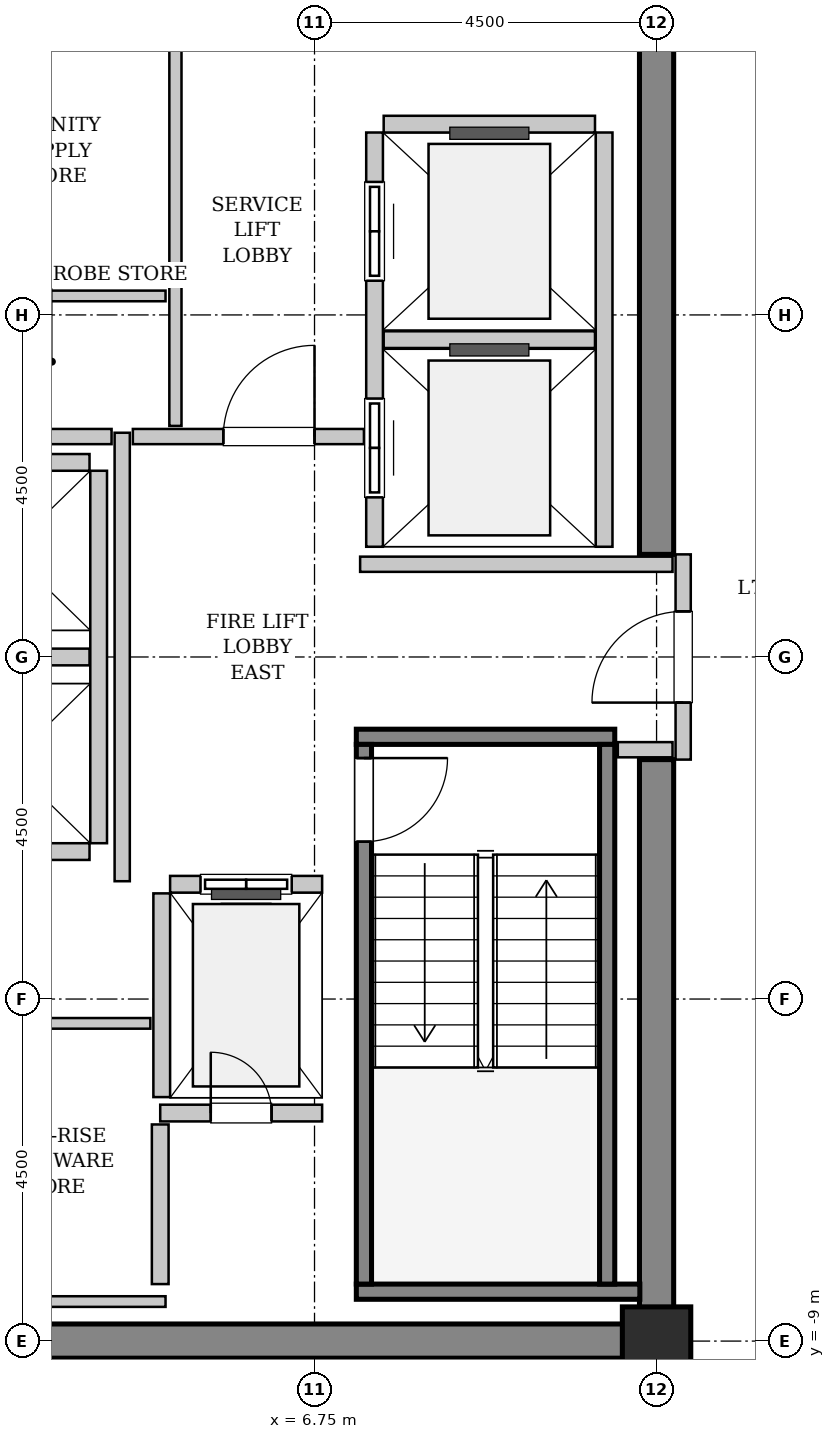
"""IFC4 building model, lengths in metres.
Left out: names, types, materials, properties, quantities, classifications, styles, units other than length and angle.
Written with IfcOpenShell. Run it as: python <this file> out.ifc"""

import sys

from ifc_helpers import new_model, si_unit, direction, frame, frame_2d, origin, origin_2d, place, context, subcontext, project, spatial, rectangle, extrude, source, transform, mapped, element, fill, save


model = new_model("IFC4")
c1 = context("Model", 3, precision=1e-05, world=origin(), true_north=direction((0.0, 1.0)))
c2 = subcontext(c1, "Body", "Model", "MODEL_VIEW")
j1 = project(units=[si_unit("LENGTHUNIT", "METRE"), si_unit("PLANEANGLEUNIT", "RADIAN")], contexts=[c1])
p1 = place(None, origin())
s1 = spatial("IfcSite", under=j1, at=p1, CompositionType="ELEMENT")
p2 = place(p1, origin())
s2 = spatial("IfcBuilding", under=s1, at=p2, CompositionType="ELEMENT")
p3 = place(p2, frame((0.0, 0.0, 310.2)))
s3 = spatial("IfcBuildingStorey", under=s2, at=p3, CompositionType="ELEMENT", Elevation=310.2)
m1 = source(origin(), c2, "Body", "SweptSolid", [
    extrude(rectangle(XDim=9.925, YDim=0.45, at=frame_2d((4.962, 0.0))), origin(), (0.0, 0.0, 1.0), 3.8),
])
p4 = place(p3, frame((1.55, -9.0, 0.0), z_axis=(0.0, 0.0, 1.0), x_axis=(1.0, 0.0, 0.0)))
e1 = element("IfcWall", 1, at=p4, inside=s3, PredefinedType="SHEAR", context=c2, shape_type="MappedRepresentation", body=[
    mapped(m1, transform((0.0, 0.0, 0.0), x_axis=(1.0, 0.0, 0.0), y_axis=(0.0, 1.0, 0.0), z_axis=(0.0, 0.0, 1.0), scale=1.0)),
])
m2 = source(origin(), c2, "Body", "SweptSolid", [
    extrude(rectangle(XDim=7.425, YDim=0.45, at=frame_2d((3.712, 0.0))), origin(), (0.0, 0.0, 1.0), 3.8),
])
for number, where, z_axis, x_axis in (
    (2, (11.25, -8.775, 0.0), (0.0, 0.0, 1.0), (0.0, 1.0, 0.0)),
    (3, (11.25, 1.35, 0.0), (0.0, 0.0, 1.0), (0.0, 1.0, 0.0)),
):
    element("IfcWall", number, at=place(p3, frame(where, z_axis=z_axis, x_axis=x_axis)), inside=s3, PredefinedType="SHEAR", context=c2, shape_type="MappedRepresentation", body=[
        mapped(m2, transform((0.0, 0.0, 0.0), x_axis=(1.0, 0.0, 0.0), y_axis=(0.0, 1.0, 0.0), z_axis=(0.0, 0.0, 1.0), scale=1.0)),
    ])
m3 = source(origin(), c2, "Body", "SweptSolid", [
    extrude(rectangle(XDim=0.9, YDim=0.9, at=origin_2d()), origin(), (0.0, 0.0, 1.0), 3.8),
])
p5 = place(p3, frame((11.25, -9.0, 0.0), z_axis=(0.0, 0.0, 1.0), x_axis=(1.0, 0.0, 0.0)))
e4 = element("IfcColumn", 4, at=p5, inside=s3, PredefinedType="COLUMN", context=c2, shape_type="MappedRepresentation", body=[
    mapped(m3, transform((0.0, 0.0, 0.0), x_axis=(1.0, 0.0, 0.0), y_axis=(0.0, 1.0, 0.0), z_axis=(0.0, 0.0, 1.0), scale=1.0)),
])
m4 = source(origin(), c2, "Body", "SweptSolid", [
    extrude(rectangle(XDim=3.4, YDim=0.2, at=frame_2d((1.7, 0.0))), origin(), (0.0, 0.0, 1.0), 3.8),
])
p6 = place(p3, frame((7.3, -1.05, 0.0), z_axis=(0.0, 0.0, 1.0), x_axis=(1.0, 0.0, 0.0)))
e5 = element("IfcWall", 5, at=p6, inside=s3, PredefinedType="SOLIDWALL", context=c2, shape_type="MappedRepresentation", body=[
    mapped(m4, transform((0.0, 0.0, 0.0), x_axis=(1.0, 0.0, 0.0), y_axis=(0.0, 1.0, 0.0), z_axis=(0.0, 0.0, 1.0), scale=1.0)),
])
m5 = source(origin(), c2, "Body", "SweptSolid", [
    extrude(rectangle(XDim=3.73, YDim=0.2, at=frame_2d((1.865, 0.0))), origin(), (0.0, 0.0, 1.0), 3.8),
])
p7 = place(p3, frame((7.3, -8.35, 0.0), z_axis=(0.0, 0.0, 1.0), x_axis=(1.0, 0.0, 0.0)))
e6 = element("IfcWall", 6, at=p7, inside=s3, PredefinedType="SOLIDWALL", context=c2, shape_type="MappedRepresentation", body=[
    mapped(m5, transform((0.0, 0.0, 0.0), x_axis=(1.0, 0.0, 0.0), y_axis=(0.0, 1.0, 0.0), z_axis=(0.0, 0.0, 1.0), scale=1.0)),
])
m6 = source(origin(), c2, "Body", "SweptSolid", [
    extrude(rectangle(XDim=7.1, YDim=0.2, at=frame_2d((3.55, 0.0))), origin(), (0.0, 0.0, 1.0), 3.8),
])
p8 = place(p3, frame((7.4, -1.15, 0.0), z_axis=(0.0, 0.0, 1.0), x_axis=(0.0, -1.0, 0.0)))
e7 = element("IfcWall", 7, at=p8, inside=s3, PredefinedType="SOLIDWALL", context=c2, shape_type="MappedRepresentation", body=[
    mapped(m6, transform((0.0, 0.0, 0.0), x_axis=(1.0, 0.0, 0.0), y_axis=(0.0, 1.0, 0.0), z_axis=(0.0, 0.0, 1.0), scale=1.0)),
])
p9 = place(p8, frame((0.18, 0.0, 0.0)))
e8 = element("IfcOpeningElement", 8, at=p9, cuts=e7, PredefinedType="OPENING", context=c2, shape_type="SweptSolid", body=[
    extrude(rectangle(XDim=1.1, YDim=2.15, at=frame_2d((0.55, 1.075))), frame((0.0, 0.11, 0.0), z_axis=(0.0, -1.0, 0.0), x_axis=(1.0, 0.0, 0.0)), (0.0, 0.0, 1.0), 0.22),
])
p10 = place(p3, frame((10.6, -1.15, 0.0), z_axis=(0.0, 0.0, 1.0), x_axis=(0.0, -1.0, 0.0)))
e9 = element("IfcWall", 9, at=p10, inside=s3, PredefinedType="SOLIDWALL", context=c2, shape_type="MappedRepresentation", body=[
    mapped(m6, transform((0.0, 0.0, 0.0), x_axis=(1.0, 0.0, 0.0), y_axis=(0.0, 1.0, 0.0), z_axis=(0.0, 0.0, 1.0), scale=1.0)),
])
m7 = source(origin(), c2, "Body", "SweptSolid", [
    extrude(rectangle(XDim=2.0, YDim=0.22, at=frame_2d((1.0, 0.0))), origin(), (0.0, 0.0, 1.0), 3.535),
])
p11 = place(p3, frame((6.85, -2.99, 0.0), z_axis=(0.0, 0.0, 1.0), x_axis=(-1.0, 0.0, 0.0)))
e10 = element("IfcWall", 10, at=p11, inside=s3, PredefinedType="SOLIDWALL", context=c2, shape_type="MappedRepresentation", body=[
    mapped(m7, transform((0.0, 0.0, 0.0), x_axis=(1.0, 0.0, 0.0), y_axis=(0.0, 1.0, 0.0), z_axis=(0.0, 0.0, 1.0), scale=1.0)),
])
p12 = place(p11, frame((0.4, 0.0, 0.0)))
e11 = element("IfcOpeningElement", 11, at=p12, cuts=e10, PredefinedType="OPENING", context=c2, shape_type="SweptSolid", body=[
    extrude(rectangle(XDim=1.2, YDim=2.2, at=frame_2d((0.6, 1.1))), frame((0.0, 0.12, 0.0), z_axis=(0.0, -1.0, 0.0), x_axis=(1.0, 0.0, 0.0)), (0.0, 0.0, 1.0), 0.24),
])
m8 = source(origin(), c2, "Body", "SweptSolid", [
    extrude(rectangle(XDim=2.68, YDim=0.22, at=frame_2d((1.34, 0.0))), origin(), (0.0, 0.0, 1.0), 3.535),
])
p13 = place(p3, frame((4.74, -3.11, 0.0), z_axis=(0.0, 0.0, 1.0), x_axis=(0.0, -1.0, 0.0)))
e12 = element("IfcWall", 12, at=p13, inside=s3, PredefinedType="SOLIDWALL", context=c2, shape_type="MappedRepresentation", body=[
    mapped(m8, transform((0.0, 0.0, 0.0), x_axis=(1.0, 0.0, 0.0), y_axis=(0.0, 1.0, 0.0), z_axis=(0.0, 0.0, 1.0), scale=1.0)),
])
m9 = source(origin(), c2, "Body", "SweptSolid", [
    extrude(rectangle(XDim=5.45, YDim=0.22, at=frame_2d((2.725, 0.0))), origin(), (0.0, 0.0, 1.0), 3.535),
])
p14 = place(p3, frame((7.54, 6.9, 0.0), z_axis=(0.0, 0.0, 1.0), x_axis=(0.0, -1.0, 0.0)))
e13 = element("IfcWall", 13, at=p14, inside=s3, PredefinedType="SOLIDWALL", context=c2, shape_type="MappedRepresentation", body=[
    mapped(m9, transform((0.0, 0.0, 0.0), x_axis=(1.0, 0.0, 0.0), y_axis=(0.0, 1.0, 0.0), z_axis=(0.0, 0.0, 1.0), scale=1.0)),
])
p15 = place(p14, frame((3.5, 0.0, 0.0)))
e14 = element("IfcOpeningElement", 14, at=p15, cuts=e13, PredefinedType="OPENING", context=c2, shape_type="SweptSolid", body=[
    extrude(rectangle(XDim=1.3, YDim=2.3, at=frame_2d((0.65, 1.15))), frame((0.0, 0.12, 0.0), z_axis=(0.0, -1.0, 0.0), x_axis=(1.0, 0.0, 0.0)), (0.0, 0.0, 1.0), 0.24),
])
p16 = place(p14, frame((0.65, 0.0, 0.0)))
e15 = element("IfcOpeningElement", 15, at=p16, cuts=e13, PredefinedType="OPENING", context=c2, shape_type="SweptSolid", body=[
    extrude(rectangle(XDim=1.3, YDim=2.3, at=frame_2d((0.65, 1.15))), frame((0.0, 0.12, 0.0), z_axis=(0.0, -1.0, 0.0), x_axis=(1.0, 0.0, 0.0)), (0.0, 0.0, 1.0), 0.24),
])
p17 = place(p3, frame((10.56, 1.45, 0.0), z_axis=(0.0, 0.0, 1.0), x_axis=(0.0, 1.0, 0.0)))
e16 = element("IfcWall", 16, at=p17, inside=s3, PredefinedType="SOLIDWALL", context=c2, shape_type="MappedRepresentation", body=[
    mapped(m9, transform((0.0, 0.0, 0.0), x_axis=(1.0, 0.0, 0.0), y_axis=(0.0, 1.0, 0.0), z_axis=(0.0, 0.0, 1.0), scale=1.0)),
])
m10 = source(origin(), c2, "Body", "SweptSolid", [
    extrude(rectangle(XDim=2.78, YDim=0.22, at=frame_2d((1.39, 0.0))), origin(), (0.0, 0.0, 1.0), 3.535),
])
for number, where, z_axis, x_axis in (
    (17, (7.66, 4.175, 0.0), (0.0, 0.0, 1.0), (1.0, 0.0, 0.0)),
    (18, (10.44, 7.01, 0.0), (0.0, 0.0, 1.0), (-1.0, 0.0, 0.0)),
):
    element("IfcWall", number, at=place(p3, frame(where, z_axis=z_axis, x_axis=x_axis)), inside=s3, PredefinedType="SOLIDWALL", context=c2, shape_type="MappedRepresentation", body=[
        mapped(m10, transform((0.0, 0.0, 0.0), x_axis=(1.0, 0.0, 0.0), y_axis=(0.0, 1.0, 0.0), z_axis=(0.0, 0.0, 1.0), scale=1.0)),
    ])
m11 = source(origin(), c2, "Body", "SweptSolid", [
    extrude(rectangle(XDim=4.9, YDim=0.22, at=frame_2d((2.45, 0.0))), origin(), (0.0, 0.0, 1.0), 3.535),
])
p18 = place(p3, frame((3.91, -2.45, 0.0), z_axis=(0.0, 0.0, 1.0), x_axis=(0.0, 1.0, 0.0)))
e19 = element("IfcWall", 19, at=p18, inside=s3, PredefinedType="SOLIDWALL", context=c2, shape_type="MappedRepresentation", body=[
    mapped(m11, transform((0.0, 0.0, 0.0), x_axis=(1.0, 0.0, 0.0), y_axis=(0.0, 1.0, 0.0), z_axis=(0.0, 0.0, 1.0), scale=1.0)),
])
m12 = source(origin(), c2, "Body", "SweptSolid", [
    extrude(rectangle(XDim=2.13, YDim=0.22, at=frame_2d((1.065, 0.0))), origin(), (0.0, 0.0, 1.0), 3.535),
])
for number, where, z_axis, x_axis in (
    (20, (1.66, -2.56, 0.0), (0.0, 0.0, 1.0), (1.0, 0.0, 0.0)),
    (21, (1.66, 0.0, 0.0), (0.0, 0.0, 1.0), (1.0, 0.0, 0.0)),
    (22, (3.79, 2.56, 0.0), (0.0, 0.0, 1.0), (-1.0, 0.0, 0.0)),
):
    element("IfcWall", number, at=place(p3, frame(where, z_axis=z_axis, x_axis=x_axis)), inside=s3, PredefinedType="SOLIDWALL", context=c2, shape_type="MappedRepresentation", body=[
        mapped(m12, transform((0.0, 0.0, 0.0), x_axis=(1.0, 0.0, 0.0), y_axis=(0.0, 1.0, 0.0), z_axis=(0.0, 0.0, 1.0), scale=1.0)),
    ])
p19 = place(p3, frame((4.72, -6.0, 0.0), z_axis=(0.0, 0.0, 1.0), x_axis=(1.0, 0.0, 0.0)))
e23 = element("IfcWall", 23, at=p19, inside=s3, PredefinedType="SOLIDWALL", context=c2, shape_type="MappedRepresentation", body=[
    mapped(m12, transform((0.0, 0.0, 0.0), x_axis=(1.0, 0.0, 0.0), y_axis=(0.0, 1.0, 0.0), z_axis=(0.0, 0.0, 1.0), scale=1.0)),
])
p20 = place(p19, frame((0.665, 0.0, 0.0)))
e24 = element("IfcOpeningElement", 24, at=p20, cuts=e23, PredefinedType="OPENING", context=c2, shape_type="SweptSolid", body=[
    extrude(rectangle(XDim=0.8, YDim=2.0, at=frame_2d((0.4, 1.0))), frame((0.0, 0.12, 0.0), z_axis=(0.0, -1.0, 0.0), x_axis=(1.0, 0.0, 0.0)), (0.0, 0.0, 1.0), 0.24),
])
m13 = source(origin(), c2, "Body", "SweptSolid", [
    extrude(rectangle(XDim=2.1, YDim=0.22, at=frame_2d((1.05, 0.0))), origin(), (0.0, 0.0, 1.0), 3.535),
])
p21 = place(p3, frame((4.72, -8.25, 0.0), z_axis=(0.0, 0.0, 1.0), x_axis=(0.0, 1.0, 0.0)))
e25 = element("IfcWall", 25, at=p21, inside=s3, PredefinedType="SOLIDWALL", context=c2, shape_type="MappedRepresentation", body=[
    mapped(m13, transform((0.0, 0.0, 0.0), x_axis=(1.0, 0.0, 0.0), y_axis=(0.0, 1.0, 0.0), z_axis=(0.0, 0.0, 1.0), scale=1.0)),
])
m14 = source(origin(), c2, "Body", "SweptSolid", [
    extrude(rectangle(XDim=2.7, YDim=0.2, at=frame_2d((1.35, 0.0))), origin(), (0.0, 0.0, 1.0), 2.625),
])
p22 = place(p3, frame((11.6, -1.35, 0.0), z_axis=(0.0, 0.0, 1.0), x_axis=(0.0, 1.0, 0.0)))
e26 = element("IfcWall", 26, at=p22, inside=s3, PredefinedType="PARTITIONING", context=c2, shape_type="MappedRepresentation", body=[
    mapped(m14, transform((0.0, 0.0, 0.0), x_axis=(1.0, 0.0, 0.0), y_axis=(0.0, 1.0, 0.0), z_axis=(0.0, 0.0, 1.0), scale=1.0)),
])
p23 = place(p22, frame((0.75, 0.0, 0.0)))
e27 = element("IfcOpeningElement", 27, at=p23, cuts=e26, PredefinedType="OPENING", context=c2, shape_type="SweptSolid", body=[
    extrude(rectangle(XDim=1.2, YDim=2.15, at=frame_2d((0.6, 1.075))), frame((0.0, 0.11, 0.0), z_axis=(0.0, -1.0, 0.0), x_axis=(1.0, 0.0, 0.0)), (0.0, 0.0, 1.0), 0.22),
])
m15 = source(origin(), c2, "Body", "SweptSolid", [
    extrude(rectangle(XDim=5.9, YDim=0.2, at=frame_2d((2.95, 0.0))), origin(), (0.0, 0.0, 1.0), 3.535),
])
p24 = place(p3, frame((4.22, -2.95, 0.0), z_axis=(0.0, 0.0, 1.0), x_axis=(0.0, 1.0, 0.0)))
e28 = element("IfcWall", 28, at=p24, inside=s3, PredefinedType="PARTITIONING", context=c2, shape_type="MappedRepresentation", body=[
    mapped(m15, transform((0.0, 0.0, 0.0), x_axis=(1.0, 0.0, 0.0), y_axis=(0.0, 1.0, 0.0), z_axis=(0.0, 0.0, 1.0), scale=1.0)),
])
m16 = source(origin(), c2, "Body", "SweptSolid", [
    extrude(rectangle(XDim=2.52, YDim=0.2, at=frame_2d((1.26, 0.0))), origin(), (0.0, 0.0, 1.0), 3.535),
])
p25 = place(p3, frame((1.56, 2.9, 0.0), z_axis=(0.0, 0.0, 1.0), x_axis=(1.0, 0.0, 0.0)))
e29 = element("IfcWall", 29, at=p25, inside=s3, PredefinedType="PARTITIONING", context=c2, shape_type="MappedRepresentation", body=[
    mapped(m16, transform((0.0, 0.0, 0.0), x_axis=(1.0, 0.0, 0.0), y_axis=(0.0, 1.0, 0.0), z_axis=(0.0, 0.0, 1.0), scale=1.0)),
])
m17 = source(origin(), c2, "Body", "SweptSolid", [
    extrude(rectangle(XDim=3.04, YDim=0.2, at=frame_2d((1.52, 0.0))), origin(), (0.0, 0.0, 1.0), 3.535),
])
p26 = place(p3, frame((4.36, 2.9, 0.0), z_axis=(0.0, 0.0, 1.0), x_axis=(1.0, 0.0, 0.0)))
e30 = element("IfcWall", 30, at=p26, inside=s3, PredefinedType="PARTITIONING", context=c2, shape_type="MappedRepresentation", body=[
    mapped(m17, transform((0.0, 0.0, 0.0), x_axis=(1.0, 0.0, 0.0), y_axis=(0.0, 1.0, 0.0), z_axis=(0.0, 0.0, 1.0), scale=1.0)),
])
p27 = place(p26, frame((1.19, 0.0, 0.0)))
e31 = element("IfcOpeningElement", 31, at=p27, cuts=e30, PredefinedType="OPENING", context=c2, shape_type="SweptSolid", body=[
    extrude(rectangle(XDim=1.2, YDim=2.15, at=frame_2d((0.6, 1.075))), frame((0.0, 0.11, 0.0), z_axis=(0.0, -1.0, 0.0), x_axis=(1.0, 0.0, 0.0)), (0.0, 0.0, 1.0), 0.22),
])
m18 = source(origin(), c2, "Body", "SweptSolid", [
    extrude(rectangle(XDim=4.11, YDim=0.2, at=frame_2d((2.055, 0.0))), origin(), (0.0, 0.0, 1.0), 3.535),
])
p28 = place(p3, frame((7.35, 1.22, 0.0), z_axis=(0.0, 0.0, 1.0), x_axis=(1.0, 0.0, 0.0)))
e32 = element("IfcWall", 32, at=p28, inside=s3, PredefinedType="PARTITIONING", context=c2, shape_type="MappedRepresentation", body=[
    mapped(m18, transform((0.0, 0.0, 0.0), x_axis=(1.0, 0.0, 0.0), y_axis=(0.0, 1.0, 0.0), z_axis=(0.0, 0.0, 1.0), scale=1.0)),
])
m19 = source(origin(), c2, "Body", "SweptSolid", [
    extrude(rectangle(XDim=0.72, YDim=0.2, at=frame_2d((0.36, 0.0))), origin(), (0.0, 0.0, 1.0), 3.535),
])
p29 = place(p3, frame((10.74, -1.22, 0.0), z_axis=(0.0, 0.0, 1.0), x_axis=(1.0, 0.0, 0.0)))
e33 = element("IfcWall", 33, at=p29, inside=s3, PredefinedType="PARTITIONING", context=c2, shape_type="MappedRepresentation", body=[
    mapped(m19, transform((0.0, 0.0, 0.0), x_axis=(1.0, 0.0, 0.0), y_axis=(0.0, 1.0, 0.0), z_axis=(0.0, 0.0, 1.0), scale=1.0)),
])
m20 = source(origin(), c2, "Body", "SweptSolid", [
    extrude(rectangle(XDim=5.45, YDim=0.16, at=frame_2d((2.725, 0.0))), origin(), (0.0, 0.0, 1.0), 3.535),
])
p30 = place(p3, frame((4.92, 3.04, 0.0), z_axis=(0.0, 0.0, 1.0), x_axis=(0.0, 1.0, 0.0)))
e34 = element("IfcWall", 34, at=p30, inside=s3, PredefinedType="PARTITIONING", context=c2, shape_type="MappedRepresentation", body=[
    mapped(m20, transform((0.0, 0.0, 0.0), x_axis=(1.0, 0.0, 0.0), y_axis=(0.0, 1.0, 0.0), z_axis=(0.0, 0.0, 1.0), scale=1.0)),
])
m21 = source(origin(), c2, "Body", "SweptSolid", [
    extrude(rectangle(XDim=3.15, YDim=0.14, at=frame_2d((1.575, 0.0))), origin(), (0.0, 0.0, 1.0), 3.535),
])
p31 = place(p3, frame((1.64, 4.75, 0.0), z_axis=(0.0, 0.0, 1.0), x_axis=(1.0, 0.0, 0.0)))
e35 = element("IfcWall", 35, at=p31, inside=s3, PredefinedType="PARTITIONING", context=c2, shape_type="MappedRepresentation", body=[
    mapped(m21, transform((0.0, 0.0, 0.0), x_axis=(1.0, 0.0, 0.0), y_axis=(0.0, 1.0, 0.0), z_axis=(0.0, 0.0, 1.0), scale=1.0)),
])
m22 = source(origin(), c2, "Body", "SweptSolid", [
    extrude(rectangle(XDim=2.95, YDim=0.14, at=frame_2d((1.475, 0.0))), origin(), (0.0, 0.0, 1.0), 3.535),
])
p32 = place(p3, frame((1.64, -4.82, 0.0), z_axis=(0.0, 0.0, 1.0), x_axis=(1.0, 0.0, 0.0)))
e36 = element("IfcWall", 36, at=p32, inside=s3, PredefinedType="PARTITIONING", context=c2, shape_type="MappedRepresentation", body=[
    mapped(m22, transform((0.0, 0.0, 0.0), x_axis=(1.0, 0.0, 0.0), y_axis=(0.0, 1.0, 0.0), z_axis=(0.0, 0.0, 1.0), scale=1.0)),
])
p33 = place(p3, frame((1.64, -8.48, 0.0), z_axis=(0.0, 0.0, 1.0), x_axis=(1.0, 0.0, 0.0)))
e37 = element("IfcWall", 37, at=p33, inside=s3, PredefinedType="PARTITIONING", context=c2, shape_type="MappedRepresentation", body=[
    mapped(m21, transform((0.0, 0.0, 0.0), x_axis=(1.0, 0.0, 0.0), y_axis=(0.0, 1.0, 0.0), z_axis=(0.0, 0.0, 1.0), scale=1.0)),
])
m23 = source(origin(), c2, "Body", "SweptSolid", [
    extrude(rectangle(XDim=1.1, YDim=2.15, at=frame_2d((0.55, 1.075))), frame((0.0, 0.025, 0.0), z_axis=(0.0, -1.0, 0.0), x_axis=(1.0, 0.0, 0.0)), (0.0, 0.0, 1.0), 0.05),
])
p34 = place(p9, origin())
e38 = element("IfcDoor", 38, at=p34, inside=s3, OperationType="SINGLE_SWING_LEFT", PredefinedType="DOOR", context=c2, shape_type="MappedRepresentation", body=[
    mapped(m23, transform((0.0, 0.0, 0.0), x_axis=(1.0, 0.0, 0.0), y_axis=(0.0, 1.0, 0.0), z_axis=(0.0, 0.0, 1.0), scale=1.0)),
])
fill(e8, e38)
m24 = source(origin(), c2, "Body", "SweptSolid", [
    extrude(rectangle(XDim=1.2, YDim=2.2, at=frame_2d((0.6, 1.1))), frame((0.0, 0.025, 0.0), z_axis=(0.0, -1.0, 0.0), x_axis=(1.0, 0.0, 0.0)), (0.0, 0.0, 1.0), 0.05),
])
p35 = place(p12, origin())
e39 = element("IfcDoor", 39, at=p35, inside=s3, OperationType="SLIDING_TO_LEFT", PredefinedType="DOOR", context=c2, shape_type="MappedRepresentation", body=[
    mapped(m24, transform((0.0, 0.0, 0.0), x_axis=(1.0, 0.0, 0.0), y_axis=(0.0, 1.0, 0.0), z_axis=(0.0, 0.0, 1.0), scale=1.0)),
])
fill(e11, e39)
m25 = source(origin(), c2, "Body", "SweptSolid", [
    extrude(rectangle(XDim=1.3, YDim=2.3, at=frame_2d((0.65, 1.15))), frame((0.0, 0.025, 0.0), z_axis=(0.0, -1.0, 0.0), x_axis=(1.0, 0.0, 0.0)), (0.0, 0.0, 1.0), 0.05),
])
p36 = place(p15, origin())
e40 = element("IfcDoor", 40, at=p36, inside=s3, OperationType="SLIDING_TO_RIGHT", PredefinedType="DOOR", context=c2, shape_type="MappedRepresentation", body=[
    mapped(m25, transform((0.0, 0.0, 0.0), x_axis=(1.0, 0.0, 0.0), y_axis=(0.0, 1.0, 0.0), z_axis=(0.0, 0.0, 1.0), scale=1.0)),
])
fill(e14, e40)
p37 = place(p16, origin())
e41 = element("IfcDoor", 41, at=p37, inside=s3, OperationType="SLIDING_TO_RIGHT", PredefinedType="DOOR", context=c2, shape_type="MappedRepresentation", body=[
    mapped(m25, transform((0.0, 0.0, 0.0), x_axis=(1.0, 0.0, 0.0), y_axis=(0.0, 1.0, 0.0), z_axis=(0.0, 0.0, 1.0), scale=1.0)),
])
fill(e15, e41)
m26 = source(origin(), c2, "Body", "SweptSolid", [
    extrude(rectangle(XDim=0.8, YDim=2.0, at=frame_2d((0.4, 1.0))), frame((0.0, 0.025, 0.0), z_axis=(0.0, -1.0, 0.0), x_axis=(1.0, 0.0, 0.0)), (0.0, 0.0, 1.0), 0.05),
])
p38 = place(p20, origin())
e42 = element("IfcDoor", 42, at=p38, inside=s3, OperationType="SINGLE_SWING_LEFT", PredefinedType="TRAPDOOR", context=c2, shape_type="MappedRepresentation", body=[
    mapped(m26, transform((0.0, 0.0, 0.0), x_axis=(1.0, 0.0, 0.0), y_axis=(0.0, 1.0, 0.0), z_axis=(0.0, 0.0, 1.0), scale=1.0)),
])
fill(e24, e42)
m27 = source(origin(), c2, "Body", "SweptSolid", [
    extrude(rectangle(XDim=1.2, YDim=2.15, at=frame_2d((0.6, 1.075))), frame((0.0, 0.025, 0.0), z_axis=(0.0, -1.0, 0.0), x_axis=(1.0, 0.0, 0.0)), (0.0, 0.0, 1.0), 0.05),
])
p39 = place(p23, origin())
e43 = element("IfcDoor", 43, at=p39, inside=s3, OperationType="SINGLE_SWING_LEFT", PredefinedType="DOOR", context=c2, shape_type="MappedRepresentation", body=[
    mapped(m27, transform((0.0, 0.0, 0.0), x_axis=(1.0, 0.0, 0.0), y_axis=(0.0, 1.0, 0.0), z_axis=(0.0, 0.0, 1.0), scale=1.0)),
])
fill(e27, e43)
p40 = place(p27, origin())
e44 = element("IfcDoor", 44, at=p40, inside=s3, OperationType="SINGLE_SWING_RIGHT", PredefinedType="DOOR", context=c2, shape_type="MappedRepresentation", body=[
    mapped(m27, transform((0.0, 0.0, 0.0), x_axis=(1.0, 0.0, 0.0), y_axis=(0.0, 1.0, 0.0), z_axis=(0.0, 0.0, 1.0), scale=1.0)),
])
fill(e31, e44)
save(model, sys.argv[1])
